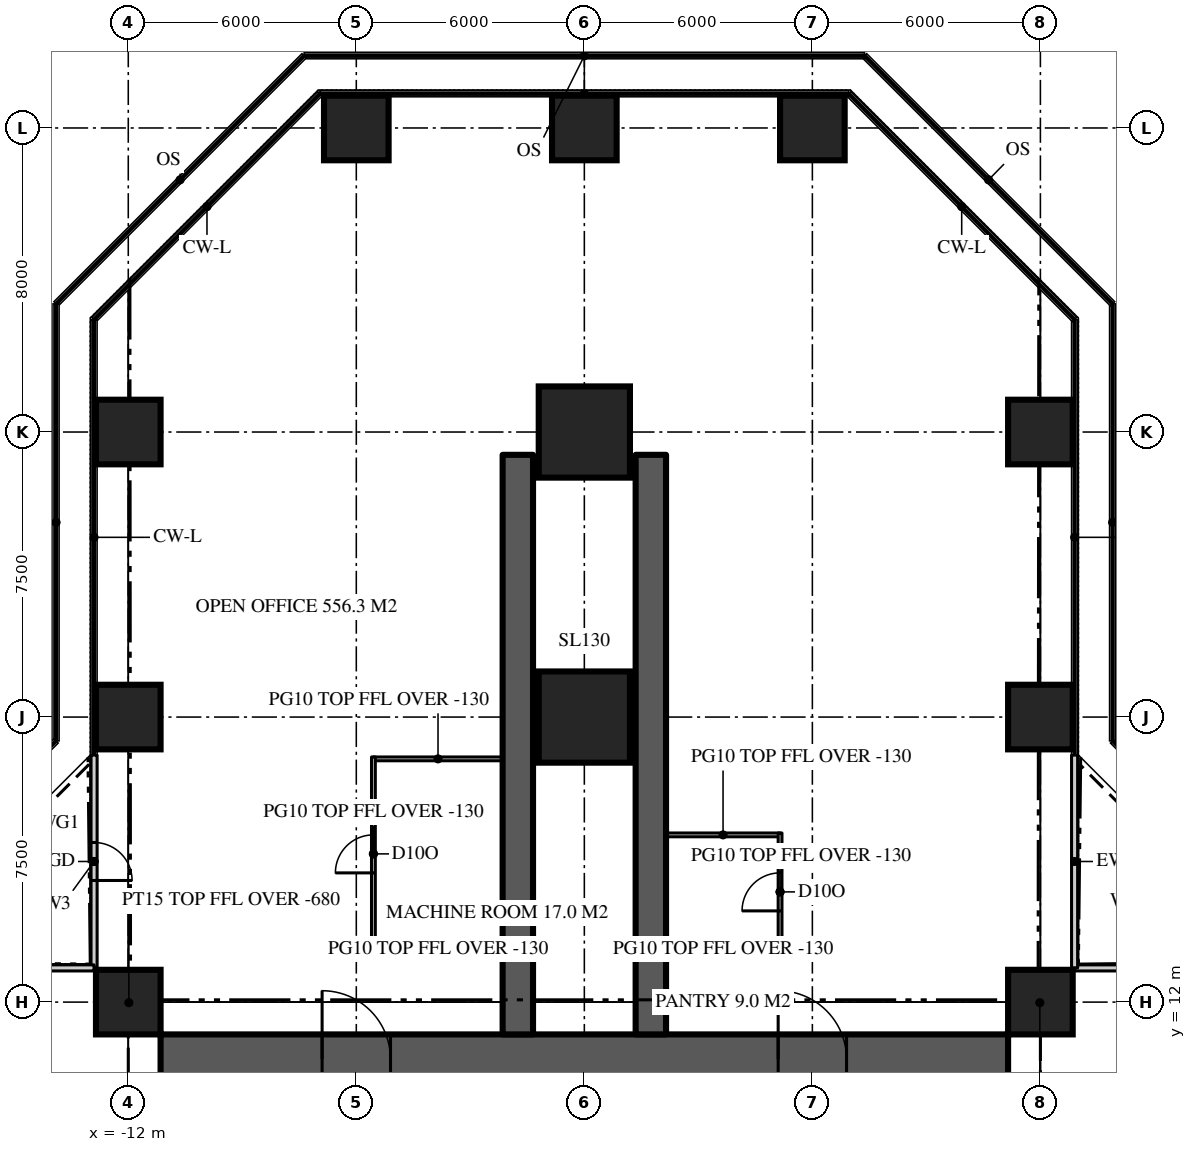
"""IFC4 building model, lengths in metres.
Left out: names, types, materials, properties, quantities, classifications, styles, units other than length and angle.
Written with IfcOpenShell. Run it as: python <this file> out.ifc"""

import sys

from ifc_helpers import new_model, si_unit, direction, frame, frame_2d, origin, origin_2d, place, context, subcontext, project, spatial, rectangle, extrude, element, fill, save


model = new_model("IFC4")
c1 = context("Model", 3, precision=1e-05, world=origin(), true_north=direction((0.0, 1.0)))
c2 = subcontext(c1, "Body", "Model", "MODEL_VIEW")
j1 = project(units=[si_unit("LENGTHUNIT", "METRE"), si_unit("PLANEANGLEUNIT", "RADIAN")], contexts=[c1])
p1 = place(None, origin())
s1 = spatial("IfcSite", under=j1, at=p1, CompositionType="ELEMENT")
p2 = place(p1, origin())
s2 = spatial("IfcBuilding", under=s1, at=p2, CompositionType="ELEMENT")
p3 = place(p2, frame((0.0, 0.0, 59.1)))
s3 = spatial("IfcBuildingStorey", under=s2, at=p3, CompositionType="ELEMENT", Elevation=59.1)
p4 = place(p3, frame((-11.15, 10.5, 0.0), z_axis=(0.0, 0.0, 1.0), x_axis=(1.0, 0.0, 0.0)))
e1 = element("IfcWall", 1, at=p4, inside=s3, PredefinedType="SHEAR", context=c2, shape_type="SweptSolid", body=[
    extrude(rectangle(XDim=22.3, YDim=1.3, at=frame_2d((11.15, 0.0))), origin(), (0.0, 0.0, 1.0), 3.9),
])
p5 = place(p4, frame((4.25, 0.0, 0.0)))
e2 = element("IfcOpeningElement", 2, at=p5, cuts=e1, PredefinedType="OPENING", context=c2, shape_type="SweptSolid", body=[
    extrude(rectangle(XDim=1.8, YDim=2.2, at=frame_2d((0.9, 1.1))), frame((0.0, 0.66, 0.0), z_axis=(0.0, -1.0, 0.0), x_axis=(1.0, 0.0, 0.0)), (0.0, 0.0, 1.0), 1.32),
])
p6 = place(p4, frame((16.25, 0.0, 0.0)))
e3 = element("IfcOpeningElement", 3, at=p6, cuts=e1, PredefinedType="OPENING", context=c2, shape_type="SweptSolid", body=[
    extrude(rectangle(XDim=1.8, YDim=2.2, at=frame_2d((0.9, 1.1))), frame((0.0, 0.66, 0.0), z_axis=(0.0, -1.0, 0.0), x_axis=(1.0, 0.0, 0.0)), (0.0, 0.0, 1.0), 1.32),
])
for number, where, z_axis, x_axis in (
    (4, (1.75, 11.15, 0.0), (0.0, 0.0, 1.0), (0.0, 1.0, 0.0)),
    (5, (-1.75, 11.15, 0.0), (0.0, 0.0, 1.0), (0.0, 1.0, 0.0)),
):
    element("IfcWall", number, at=place(p3, frame(where, z_axis=z_axis, x_axis=x_axis)), inside=s3, PredefinedType="SHEAR", context=c2, shape_type="SweptSolid", body=[
        extrude(rectangle(XDim=15.25, YDim=0.8, at=frame_2d((7.625, 0.0))), origin(), (0.0, 0.0, 1.0), 3.9),
    ])
for number, where, z_axis, x_axis in (
    (6, (-12.0, 12.0, 0.0), (0.0, 0.0, 1.0), (1.0, 0.0, 0.0)),
    (7, (12.0, 12.0, 0.0), (0.0, 0.0, 1.0), (1.0, 0.0, 0.0)),
    (8, (-12.0, 19.5, 0.0), (0.0, 0.0, 1.0), (1.0, 0.0, 0.0)),
):
    element("IfcColumn", number, at=place(p3, frame(where, z_axis=z_axis, x_axis=x_axis)), inside=s3, PredefinedType="COLUMN", context=c2, shape_type="SweptSolid", body=[
        extrude(rectangle(XDim=1.7, YDim=1.7, at=origin_2d()), origin(), (0.0, 0.0, 1.0), 3.9),
    ])
p7 = place(p3, frame((0.0, 19.5, 0.0), z_axis=(0.0, 0.0, 1.0), x_axis=(1.0, 0.0, 0.0)))
e9 = element("IfcColumn", 9, at=p7, inside=s3, PredefinedType="COLUMN", context=c2, shape_type="SweptSolid", body=[
    extrude(rectangle(XDim=2.4, YDim=2.4, at=origin_2d()), origin(), (0.0, 0.0, 1.0), 3.9),
])
for number, where, z_axis, x_axis in (
    (10, (12.0, 19.5, 0.0), (0.0, 0.0, 1.0), (1.0, 0.0, 0.0)),
    (11, (-12.0, 27.0, 0.0), (0.0, 0.0, 1.0), (1.0, 0.0, 0.0)),
):
    element("IfcColumn", number, at=place(p3, frame(where, z_axis=z_axis, x_axis=x_axis)), inside=s3, PredefinedType="COLUMN", context=c2, shape_type="SweptSolid", body=[
        extrude(rectangle(XDim=1.7, YDim=1.7, at=origin_2d()), origin(), (0.0, 0.0, 1.0), 3.9),
    ])
p8 = place(p3, frame((0.0, 27.0, 0.0), z_axis=(0.0, 0.0, 1.0), x_axis=(1.0, 0.0, 0.0)))
e12 = element("IfcColumn", 12, at=p8, inside=s3, PredefinedType="COLUMN", context=c2, shape_type="SweptSolid", body=[
    extrude(rectangle(XDim=2.4, YDim=2.4, at=origin_2d()), origin(), (0.0, 0.0, 1.0), 3.9),
])
for number, where, z_axis, x_axis in (
    (13, (12.0, 27.0, 0.0), (0.0, 0.0, 1.0), (1.0, 0.0, 0.0)),
    (14, (-6.0, 35.0, 0.0), (0.0, 0.0, 1.0), (1.0, 0.0, 0.0)),
    (15, (0.0, 35.0, 0.0), (0.0, 0.0, 1.0), (1.0, 0.0, 0.0)),
    (16, (6.0, 35.0, 0.0), (0.0, 0.0, 1.0), (1.0, 0.0, 0.0)),
):
    element("IfcColumn", number, at=place(p3, frame(where, z_axis=z_axis, x_axis=x_axis)), inside=s3, PredefinedType="COLUMN", context=c2, shape_type="SweptSolid", body=[
        extrude(rectangle(XDim=1.7, YDim=1.7, at=origin_2d()), origin(), (0.0, 0.0, 1.0), 3.9),
    ])
p9 = place(p3, frame((18.5, 12.9, 0.0), z_axis=(0.0, 0.0, 1.0), x_axis=(-1.0, 0.0, 0.0)))
e17 = element("IfcWall", 17, at=p9, inside=s3, PredefinedType="SOLIDWALL", context=c2, shape_type="SweptSolid", body=[
    extrude(rectangle(XDim=5.6, YDim=0.16, at=frame_2d((2.8, 0.0))), origin(), (0.0, 0.0, 1.0), 3.77),
])
p10 = place(p9, frame((2.3, 0.0, 0.0)))
e18 = element("IfcOpeningElement", 18, at=p10, cuts=e17, PredefinedType="OPENING", context=c2, shape_type="SweptSolid", body=[
    extrude(rectangle(XDim=1.0, YDim=2.2, at=frame_2d((0.5, 1.1))), frame((0.0, 0.09, 0.0), z_axis=(0.0, -1.0, 0.0), x_axis=(1.0, 0.0, 0.0)), (0.0, 0.0, 1.0), 0.18),
])
p11 = place(p3, frame((12.9, 12.9, 0.0), z_axis=(0.0, 0.0, 1.0), x_axis=(0.0, 1.0, 0.0)))
e19 = element("IfcWall", 19, at=p11, inside=s3, PredefinedType="SOLIDWALL", context=c2, shape_type="SweptSolid", body=[
    extrude(rectangle(XDim=5.6, YDim=0.16, at=frame_2d((2.8, 0.0))), origin(), (0.0, 0.0, 1.0), 3.77),
])
p12 = place(p3, frame((-12.9, 18.5, 0.0), z_axis=(0.0, 0.0, 1.0), x_axis=(0.0, -1.0, 0.0)))
e20 = element("IfcWall", 20, at=p12, inside=s3, PredefinedType="SOLIDWALL", context=c2, shape_type="SweptSolid", body=[
    extrude(rectangle(XDim=5.6, YDim=0.16, at=frame_2d((2.8, 0.0))), origin(), (0.0, 0.0, 1.0), 3.77),
])
p13 = place(p12, frame((2.3, 0.0, 0.0)))
e21 = element("IfcOpeningElement", 21, at=p13, cuts=e20, PredefinedType="OPENING", context=c2, shape_type="SweptSolid", body=[
    extrude(rectangle(XDim=1.0, YDim=2.2, at=frame_2d((0.5, 1.1))), frame((0.0, 0.09, 0.0), z_axis=(0.0, -1.0, 0.0), x_axis=(1.0, 0.0, 0.0)), (0.0, 0.0, 1.0), 0.18),
])
p14 = place(p3, frame((-12.9, 12.9, 0.0), z_axis=(0.0, 0.0, 1.0), x_axis=(-1.0, 0.0, 0.0)))
e22 = element("IfcWall", 22, at=p14, inside=s3, PredefinedType="SOLIDWALL", context=c2, shape_type="SweptSolid", body=[
    extrude(rectangle(XDim=5.6, YDim=0.16, at=frame_2d((2.8, 0.0))), origin(), (0.0, 0.0, 1.0), 3.77),
])
for number, where, z_axis, x_axis in (
    (23, (-2.15, 13.4, 0.0), (0.0, 0.0, 1.0), (-1.0, 0.0, 0.0)),
    (24, (-2.15, 18.4, 0.0), (0.0, 0.0, 1.0), (-1.0, 0.0, 0.0)),
):
    element("IfcWall", number, at=place(p3, frame(where, z_axis=z_axis, x_axis=x_axis)), inside=s3, PredefinedType="PARTITIONING", context=c2, shape_type="SweptSolid", body=[
        extrude(rectangle(XDim=3.4, YDim=0.1, at=frame_2d((1.7, 0.0))), origin(), (0.0, 0.0, 1.0), 3.77),
    ])
p15 = place(p3, frame((-5.55, 13.35, 0.0), z_axis=(0.0, 0.0, 1.0), x_axis=(0.0, 1.0, 0.0)))
e25 = element("IfcWall", 25, at=p15, inside=s3, PredefinedType="PARTITIONING", context=c2, shape_type="SweptSolid", body=[
    extrude(rectangle(XDim=5.1, YDim=0.1, at=frame_2d((2.55, 0.0))), origin(), (0.0, 0.0, 1.0), 3.77),
])
p16 = place(p15, frame((2.05, 0.0, 0.0)))
e26 = element("IfcOpeningElement", 26, at=p16, cuts=e25, PredefinedType="OPENING", context=c2, shape_type="SweptSolid", body=[
    extrude(rectangle(XDim=1.0, YDim=2.2, at=frame_2d((0.5, 1.1))), frame((0.0, 0.06, 0.0), z_axis=(0.0, -1.0, 0.0), x_axis=(1.0, 0.0, 0.0)), (0.0, 0.0, 1.0), 0.12),
])
for number, where, z_axis, x_axis in (
    (27, (2.15, 13.4, 0.0), (0.0, 0.0, 1.0), (1.0, 0.0, 0.0)),
    (28, (2.15, 16.4, 0.0), (0.0, 0.0, 1.0), (1.0, 0.0, 0.0)),
):
    element("IfcWall", number, at=place(p3, frame(where, z_axis=z_axis, x_axis=x_axis)), inside=s3, PredefinedType="PARTITIONING", context=c2, shape_type="SweptSolid", body=[
        extrude(rectangle(XDim=3.0, YDim=0.1, at=frame_2d((1.5, 0.0))), origin(), (0.0, 0.0, 1.0), 3.77),
    ])
p17 = place(p3, frame((5.15, 13.35, 0.0), z_axis=(0.0, 0.0, 1.0), x_axis=(0.0, 1.0, 0.0)))
e29 = element("IfcWall", 29, at=p17, inside=s3, PredefinedType="PARTITIONING", context=c2, shape_type="SweptSolid", body=[
    extrude(rectangle(XDim=3.1, YDim=0.1, at=frame_2d((1.55, 0.0))), origin(), (0.0, 0.0, 1.0), 3.77),
])
p18 = place(p17, frame((1.05, 0.0, 0.0)))
e30 = element("IfcOpeningElement", 30, at=p18, cuts=e29, PredefinedType="OPENING", context=c2, shape_type="SweptSolid", body=[
    extrude(rectangle(XDim=1.0, YDim=2.2, at=frame_2d((0.5, 1.1))), frame((0.0, 0.06, 0.0), z_axis=(0.0, -1.0, 0.0), x_axis=(1.0, 0.0, 0.0)), (0.0, 0.0, 1.0), 0.12),
])
for number, where, z_axis, x_axis in (
    (31, (11.15, 11.15, 0.0), (0.0, 0.0, 1.0), (0.707, 0.707, 0.0)),
    (32, (-11.15, 11.15, 0.0), (0.0, 0.0, 1.0), (-0.707, 0.707, 0.0)),
):
    element("IfcWall", number, at=place(p3, frame(where, z_axis=z_axis, x_axis=x_axis)), inside=s3, PredefinedType="PARTITIONING", context=c2, shape_type="SweptSolid", body=[
        extrude(rectangle(XDim=2.362, YDim=0.15, at=frame_2d((1.181, 0.0))), origin(), (0.0, 0.0, 1.0), 3.22),
    ])
p19 = place(p13, origin())
e33 = element("IfcDoor", 33, at=p19, inside=s3, OperationType="SINGLE_SWING_RIGHT", PredefinedType="DOOR", context=c2, shape_type="SweptSolid", body=[
    extrude(rectangle(XDim=1.0, YDim=2.2, at=frame_2d((0.5, 1.1))), frame((0.0, 0.025, 0.0), z_axis=(0.0, -1.0, 0.0), x_axis=(1.0, 0.0, 0.0)), (0.0, 0.0, 1.0), 0.05),
])
fill(e21, e33)
p20 = place(p5, origin())
e34 = element("IfcDoor", 34, at=p20, inside=s3, OperationType="DOUBLE_DOOR_DOUBLE_SWING", PredefinedType="DOOR", context=c2, shape_type="SweptSolid", body=[
    extrude(rectangle(XDim=1.8, YDim=2.2, at=frame_2d((0.9, 1.1))), frame((0.0, 0.025, 0.0), z_axis=(0.0, -1.0, 0.0), x_axis=(1.0, 0.0, 0.0)), (0.0, 0.0, 1.0), 0.05),
])
fill(e2, e34)
p21 = place(p6, origin())
e35 = element("IfcDoor", 35, at=p21, inside=s3, OperationType="DOUBLE_DOOR_DOUBLE_SWING", PredefinedType="DOOR", context=c2, shape_type="SweptSolid", body=[
    extrude(rectangle(XDim=1.8, YDim=2.2, at=frame_2d((0.9, 1.1))), frame((0.0, 0.025, 0.0), z_axis=(0.0, -1.0, 0.0), x_axis=(1.0, 0.0, 0.0)), (0.0, 0.0, 1.0), 0.05),
])
fill(e3, e35)
p22 = place(p16, origin())
e36 = element("IfcDoor", 36, at=p22, inside=s3, OperationType="SINGLE_SWING_LEFT", PredefinedType="DOOR", context=c2, shape_type="SweptSolid", body=[
    extrude(rectangle(XDim=1.0, YDim=2.2, at=frame_2d((0.5, 1.1))), frame((0.0, 0.025, 0.0), z_axis=(0.0, -1.0, 0.0), x_axis=(1.0, 0.0, 0.0)), (0.0, 0.0, 1.0), 0.05),
])
fill(e26, e36)
p23 = place(p18, origin())
e37 = element("IfcDoor", 37, at=p23, inside=s3, OperationType="SINGLE_SWING_LEFT", PredefinedType="DOOR", context=c2, shape_type="SweptSolid", body=[
    extrude(rectangle(XDim=1.0, YDim=2.2, at=frame_2d((0.5, 1.1))), frame((0.0, 0.025, 0.0), z_axis=(0.0, -1.0, 0.0), x_axis=(1.0, 0.0, 0.0)), (0.0, 0.0, 1.0), 0.05),
])
fill(e30, e37)
save(model, sys.argv[1])
